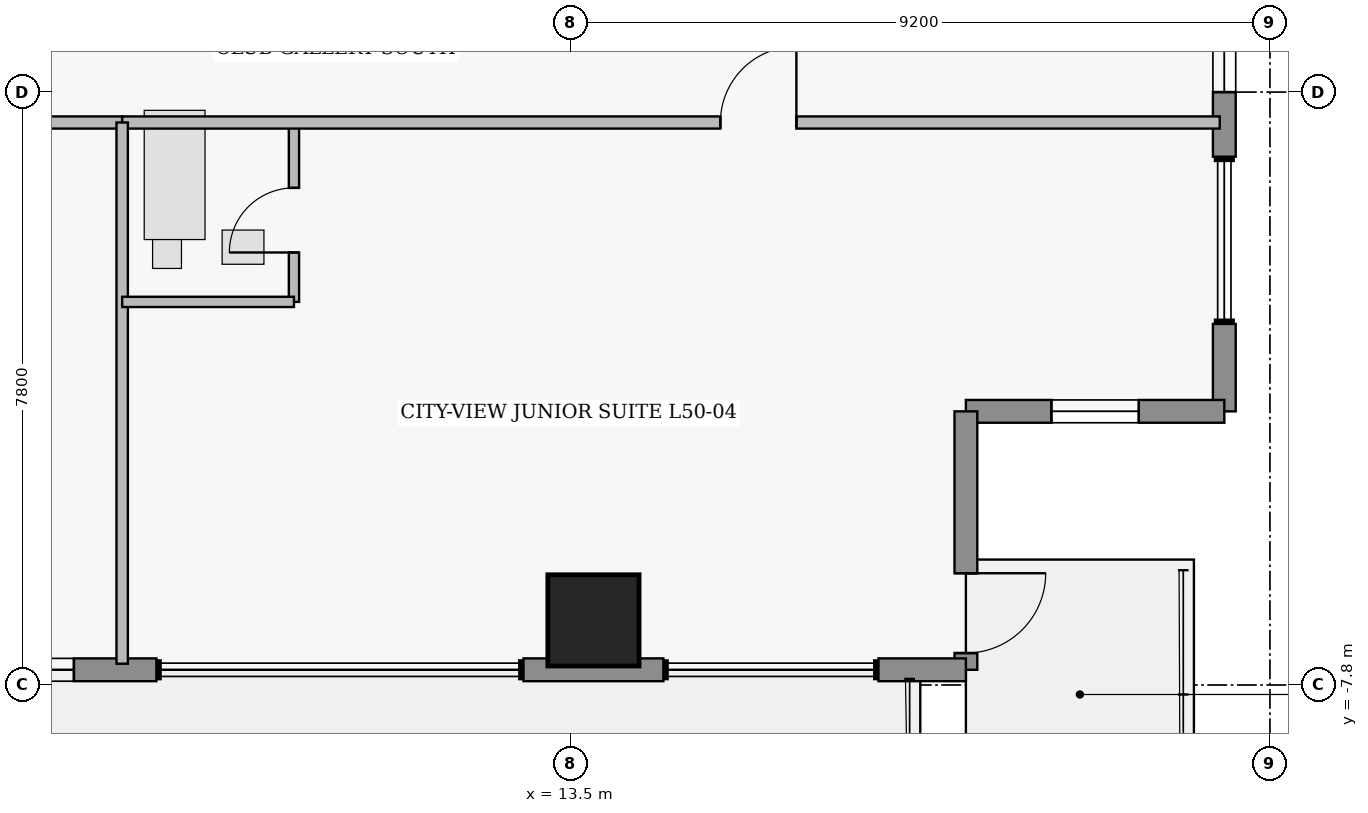
"""IFC4 building model, lengths in metres.
Left out: names, types, materials, properties, quantities, classifications, styles, units other than length and angle.
Written with IfcOpenShell. Run it as: python <this file> out.ifc"""

import sys

from ifc_helpers import new_model, si_unit, direction, frame, frame_2d, origin, origin_2d, place, context, subcontext, project, spatial, rectangle, extrude, element, fill, save


model = new_model("IFC4")
c1 = context("Model", 3, precision=1e-05, world=origin(), true_north=direction((0.0, 1.0)))
c2 = subcontext(c1, "Body", "Model", "MODEL_VIEW")
j1 = project(units=[si_unit("LENGTHUNIT", "METRE"), si_unit("PLANEANGLEUNIT", "RADIAN")], contexts=[c1])
p1 = place(None, origin())
s1 = spatial("IfcSite", under=j1, at=p1, CompositionType="ELEMENT")
p2 = place(p1, origin())
s2 = spatial("IfcBuilding", under=s1, at=p2, CompositionType="ELEMENT")
p3 = place(p2, frame((0.0, 0.0, 199.9)))
s3 = spatial("IfcBuildingStorey", under=s2, at=p3, CompositionType="ELEMENT", Elevation=199.9)
p4 = place(p3, frame((13.8, -6.95, 0.0), z_axis=(0.0, 0.0, 1.0), x_axis=(1.0, 0.0, 0.0)))
e1 = element("IfcColumn", 1, at=p4, inside=s3, PredefinedType="COLUMN", context=c2, shape_type="SweptSolid", body=[
    extrude(rectangle(XDim=1.2, YDim=1.2, at=origin_2d()), origin(), (0.0, 0.0, 1.0), 3.75),
])
p5 = place(p3, frame((22.1, 2.0, 0.0), z_axis=(0.0, 0.0, 1.0), x_axis=(0.0, -1.0, 0.0)))
e2 = element("IfcWall", 2, at=p5, inside=s3, PredefinedType="STANDARD", context=c2, shape_type="SweptSolid", body=[
    extrude(rectangle(XDim=2.85, YDim=0.3, at=frame_2d((1.425, 0.0))), origin(), (0.0, 0.0, 1.0), 3.53),
])
p6 = place(p5, frame((0.85, 0.0, 0.95)))
e3 = element("IfcOpeningElement", 3, at=p6, cuts=e2, PredefinedType="OPENING", context=c2, shape_type="SweptSolid", body=[
    extrude(rectangle(XDim=1.15, YDim=1.55, at=frame_2d((0.575, 0.775))), frame((0.0, 0.16, 0.0), z_axis=(0.0, -1.0, 0.0), x_axis=(1.0, 0.0, 0.0)), (0.0, 0.0, 1.0), 0.32),
])
p7 = place(p3, frame((22.1, -3.05, 0.0), z_axis=(0.0, 0.0, 1.0), x_axis=(0.0, -1.0, 0.0)))
e4 = element("IfcWall", 4, at=p7, inside=s3, PredefinedType="STANDARD", context=c2, shape_type="SweptSolid", body=[
    extrude(rectangle(XDim=1.15, YDim=0.3, at=frame_2d((0.575, 0.0))), origin(), (0.0, 0.0, 1.0), 3.53),
])
p8 = place(p3, frame((22.1, -4.2, 0.0), z_axis=(0.0, 0.0, 1.0), x_axis=(-1.0, 0.0, 0.0)))
e5 = element("IfcWall", 5, at=p8, inside=s3, PredefinedType="STANDARD", context=c2, shape_type="SweptSolid", body=[
    extrude(rectangle(XDim=3.4, YDim=0.3, at=frame_2d((1.7, 0.0))), origin(), (0.0, 0.0, 1.0), 3.53),
])
p9 = place(p8, frame((1.125, 0.0, 1.25)))
e6 = element("IfcOpeningElement", 6, at=p9, cuts=e5, PredefinedType="OPENING", context=c2, shape_type="SweptSolid", body=[
    extrude(rectangle(XDim=1.15, YDim=1.55, at=frame_2d((0.575, 0.775))), frame((0.0, 0.16, 0.0), z_axis=(0.0, -1.0, 0.0), x_axis=(1.0, 0.0, 0.0)), (0.0, 0.0, 1.0), 0.32),
])
p10 = place(p3, frame((18.7, -4.2, 0.0), z_axis=(0.0, 0.0, 1.0), x_axis=(0.0, -1.0, 0.0)))
e7 = element("IfcWall", 7, at=p10, inside=s3, PredefinedType="STANDARD", context=c2, shape_type="SweptSolid", body=[
    extrude(rectangle(XDim=3.4, YDim=0.3, at=frame_2d((1.7, 0.0))), origin(), (0.0, 0.0, 1.0), 3.53),
])
p11 = place(p10, frame((2.13, 0.0, 0.0)))
e8 = element("IfcOpeningElement", 8, at=p11, cuts=e7, PredefinedType="OPENING", context=c2, shape_type="SweptSolid", body=[
    extrude(rectangle(XDim=1.05, YDim=2.2, at=frame_2d((0.525, 1.1))), frame((0.0, 0.16, 0.0), z_axis=(0.0, -1.0, 0.0), x_axis=(1.0, 0.0, 0.0)), (0.0, 0.0, 1.0), 0.32),
])
p12 = place(p3, frame((18.7, -7.6, 0.0), z_axis=(0.0, 0.0, 1.0), x_axis=(-1.0, 0.0, 0.0)))
e9 = element("IfcWall", 9, at=p12, inside=s3, PredefinedType="STANDARD", context=c2, shape_type="SweptSolid", body=[
    extrude(rectangle(XDim=1.15, YDim=0.3, at=frame_2d((0.575, 0.0))), origin(), (0.0, 0.0, 1.0), 3.53),
])
p13 = place(p3, frame((14.72, -7.6, 0.0), z_axis=(0.0, 0.0, 1.0), x_axis=(-1.0, 0.0, 0.0)))
e10 = element("IfcWall", 10, at=p13, inside=s3, PredefinedType="STANDARD", context=c2, shape_type="SweptSolid", body=[
    extrude(rectangle(XDim=1.84, YDim=0.3, at=frame_2d((0.92, 0.0))), origin(), (0.0, 0.0, 1.0), 3.53),
])
p14 = place(p3, frame((8.05, -7.6, 0.0), z_axis=(0.0, 0.0, 1.0), x_axis=(-1.0, 0.0, 0.0)))
e11 = element("IfcWall", 11, at=p14, inside=s3, PredefinedType="STANDARD", context=c2, shape_type="SweptSolid", body=[
    extrude(rectangle(XDim=4.37, YDim=0.3, at=frame_2d((2.185, 0.0))), origin(), (0.0, 0.0, 1.0), 3.53),
])
p15 = place(p14, frame((1.085, 0.0, 0.95)))
e12 = element("IfcOpeningElement", 12, at=p15, cuts=e11, PredefinedType="OPENING", context=c2, shape_type="SweptSolid", body=[
    extrude(rectangle(XDim=1.15, YDim=1.55, at=frame_2d((0.575, 0.775))), frame((0.0, 0.16, 0.0), z_axis=(0.0, -1.0, 0.0), x_axis=(1.0, 0.0, 0.0)), (0.0, 0.0, 1.0), 0.32),
])
p16 = place(p3, frame((-0.2, -0.4, 0.0), z_axis=(0.0, 0.0, 1.0), x_axis=(1.0, 0.0, 0.0)))
e13 = element("IfcWall", 13, at=p16, inside=s3, PredefinedType="PARTITIONING", context=c2, shape_type="SweptSolid", body=[
    extrude(rectangle(XDim=7.8, YDim=0.16, at=frame_2d((3.9, 0.0))), origin(), (0.0, 0.0, 1.0), 3.53),
])
p17 = place(p16, frame((4.55, 0.0, 0.0)))
e14 = element("IfcOpeningElement", 14, at=p17, cuts=e13, PredefinedType="OPENING", context=c2, shape_type="SweptSolid", body=[
    extrude(rectangle(XDim=1.0, YDim=2.15, at=frame_2d((0.5, 1.075))), frame((0.0, 0.09, 0.0), z_axis=(0.0, -1.0, 0.0), x_axis=(1.0, 0.0, 0.0)), (0.0, 0.0, 1.0), 0.18),
])
p18 = place(p3, frame((9.86, -2.76, 0.0), z_axis=(0.0, 0.0, 1.0), x_axis=(0.0, 1.0, 0.0)))
e15 = element("IfcWall", 15, at=p18, inside=s3, PredefinedType="PLUMBINGWALL", context=c2, shape_type="SweptSolid", body=[
    extrude(rectangle(XDim=2.36, YDim=0.135, at=frame_2d((1.18, 0.0))), origin(), (0.0, 0.0, 1.0), 3.53),
])
p19 = place(p18, frame((0.65, 0.0, 0.0)))
e16 = element("IfcOpeningElement", 16, at=p19, cuts=e15, PredefinedType="OPENING", context=c2, shape_type="SweptSolid", body=[
    extrude(rectangle(XDim=0.85, YDim=2.1, at=frame_2d((0.425, 1.05))), frame((0.0, 0.077, 0.0), z_axis=(0.0, -1.0, 0.0), x_axis=(1.0, 0.0, 0.0)), (0.0, 0.0, 1.0), 0.155),
])
p20 = place(p3, frame((7.6, -0.4, 0.0), z_axis=(0.0, 0.0, 1.0), x_axis=(1.0, 0.0, 0.0)))
e17 = element("IfcWall", 17, at=p20, inside=s3, PredefinedType="PARTITIONING", context=c2, shape_type="SweptSolid", body=[
    extrude(rectangle(XDim=14.44, YDim=0.16, at=frame_2d((7.22, 0.0))), origin(), (0.0, 0.0, 1.0), 3.53),
])
p21 = place(p20, frame((7.87, 0.0, 0.0)))
e18 = element("IfcOpeningElement", 18, at=p21, cuts=e17, PredefinedType="OPENING", context=c2, shape_type="SweptSolid", body=[
    extrude(rectangle(XDim=1.0, YDim=2.15, at=frame_2d((0.5, 1.075))), frame((0.0, 0.09, 0.0), z_axis=(0.0, -1.0, 0.0), x_axis=(1.0, 0.0, 0.0)), (0.0, 0.0, 1.0), 0.18),
])
p22 = place(p3, frame((7.6, -7.52, 0.0), z_axis=(0.0, 0.0, 1.0), x_axis=(0.0, 1.0, 0.0)))
e19 = element("IfcWall", 19, at=p22, inside=s3, PredefinedType="PARTITIONING", context=c2, shape_type="SweptSolid", body=[
    extrude(rectangle(XDim=7.12, YDim=0.15, at=frame_2d((3.56, 0.0))), origin(), (0.0, 0.0, 1.0), 3.53),
])
p23 = place(p3, frame((7.6, -2.76, 0.0), z_axis=(0.0, 0.0, 1.0), x_axis=(1.0, 0.0, 0.0)))
e20 = element("IfcWall", 20, at=p23, inside=s3, PredefinedType="PLUMBINGWALL", context=c2, shape_type="SweptSolid", body=[
    extrude(rectangle(XDim=2.26, YDim=0.135, at=frame_2d((1.13, 0.0))), origin(), (0.0, 0.0, 1.0), 3.124),
])
p24 = place(p6, origin())
e21 = element("IfcWindow", 21, at=p24, inside=s3, PartitioningType="SINGLE_PANEL", PredefinedType="WINDOW", context=c2, shape_type="SweptSolid", body=[
    extrude(rectangle(XDim=1.15, YDim=1.55, at=frame_2d((0.575, 0.775))), frame((0.0, 0.03, 0.0), z_axis=(0.0, -1.0, 0.0), x_axis=(1.0, 0.0, 0.0)), (0.0, 0.0, 1.0), 0.06),
])
fill(e3, e21)
p25 = place(p9, origin())
e22 = element("IfcWindow", 22, at=p25, inside=s3, PartitioningType="SINGLE_PANEL", PredefinedType="WINDOW", context=c2, shape_type="SweptSolid", body=[
    extrude(rectangle(XDim=1.15, YDim=1.55, at=frame_2d((0.575, 0.775))), frame((0.0, 0.03, 0.0), z_axis=(0.0, -1.0, 0.0), x_axis=(1.0, 0.0, 0.0)), (0.0, 0.0, 1.0), 0.06),
])
fill(e6, e22)
p26 = place(p11, origin())
e23 = element("IfcDoor", 23, at=p26, inside=s3, OperationType="SINGLE_SWING_LEFT", PredefinedType="DOOR", context=c2, shape_type="SweptSolid", body=[
    extrude(rectangle(XDim=1.05, YDim=2.2, at=frame_2d((0.525, 1.1))), frame((0.0, 0.025, 0.0), z_axis=(0.0, -1.0, 0.0), x_axis=(1.0, 0.0, 0.0)), (0.0, 0.0, 1.0), 0.05),
])
fill(e8, e23)
p27 = place(p15, origin())
e24 = element("IfcWindow", 24, at=p27, inside=s3, PartitioningType="SINGLE_PANEL", PredefinedType="WINDOW", context=c2, shape_type="SweptSolid", body=[
    extrude(rectangle(XDim=1.15, YDim=1.55, at=frame_2d((0.575, 0.775))), frame((0.0, 0.03, 0.0), z_axis=(0.0, -1.0, 0.0), x_axis=(1.0, 0.0, 0.0)), (0.0, 0.0, 1.0), 0.06),
])
fill(e12, e24)
p28 = place(p19, origin())
e25 = element("IfcDoor", 25, at=p28, inside=s3, OperationType="SINGLE_SWING_LEFT", PredefinedType="DOOR", context=c2, shape_type="SweptSolid", body=[
    extrude(rectangle(XDim=0.85, YDim=2.1, at=frame_2d((0.425, 1.05))), frame((0.0, 0.025, 0.0), z_axis=(0.0, -1.0, 0.0), x_axis=(1.0, 0.0, 0.0)), (0.0, 0.0, 1.0), 0.05),
])
fill(e16, e25)
p29 = place(p21, origin())
e26 = element("IfcDoor", 26, at=p29, inside=s3, OperationType="SINGLE_SWING_RIGHT", PredefinedType="DOOR", context=c2, shape_type="SweptSolid", body=[
    extrude(rectangle(XDim=1.0, YDim=2.15, at=frame_2d((0.5, 1.075))), frame((0.0, 0.025, 0.0), z_axis=(0.0, -1.0, 0.0), x_axis=(1.0, 0.0, 0.0)), (0.0, 0.0, 1.0), 0.05),
])
fill(e18, e26)
save(model, sys.argv[1])
